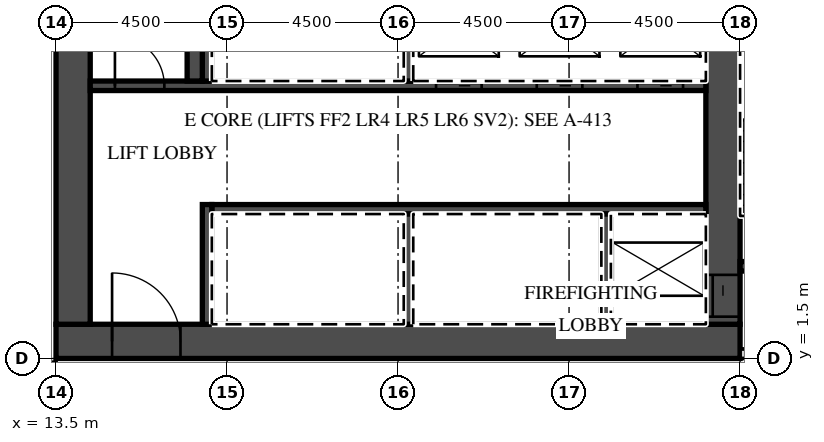
"""IFC4 building model, lengths in metres.
Left out: names, types, materials, properties, quantities, classifications, styles, units other than length and angle.
Written with IfcOpenShell. Run it as: python <this file> out.ifc"""

import sys

from ifc_helpers import new_model, si_unit, direction, frame, frame_2d, origin, place, context, subcontext, project, spatial, rectangle, extrude, element, fill, save


model = new_model("IFC4")
c1 = context("Model", 3, precision=1e-05, world=origin(), true_north=direction((0.0, 1.0)))
c2 = subcontext(c1, "Body", "Model", "MODEL_VIEW")
j1 = project(units=[si_unit("LENGTHUNIT", "METRE"), si_unit("PLANEANGLEUNIT", "RADIAN")], contexts=[c1])
p1 = place(None, origin())
s1 = spatial("IfcSite", under=j1, at=p1, CompositionType="ELEMENT")
p2 = place(p1, origin())
s2 = spatial("IfcBuilding", under=s1, at=p2, CompositionType="ELEMENT")
p3 = place(p2, frame((0.0, 0.0, 124.0)))
s3 = spatial("IfcBuildingStorey", under=s2, at=p3, CompositionType="ELEMENT", Elevation=124.0)
p4 = place(p3, frame((-39.316, 1.3, 0.0), z_axis=(0.0, 0.0, 1.0), x_axis=(1.0, 0.0, 0.0)))
e1 = element("IfcWall", 1, at=p4, inside=s3, PredefinedType="PARTITIONING", context=c2, shape_type="SweptSolid", body=[
    extrude(rectangle(XDim=52.816, YDim=0.2, at=frame_2d((26.408, 0.0))), origin(), (0.0, 0.0, 1.0), 3.02),
])
p5 = place(p4, frame((0.15, 0.0, 0.0)))
e2 = element("IfcOpeningElement", 2, at=p5, cuts=e1, PredefinedType="OPENING", context=c2, shape_type="SweptSolid", body=[
    extrude(rectangle(XDim=0.9, YDim=2.1, at=frame_2d((0.45, 1.05))), frame((0.0, 0.11, 0.0), z_axis=(0.0, -1.0, 0.0), x_axis=(1.0, 0.0, 0.0)), (0.0, 0.0, 1.0), 0.22),
])
p6 = place(p4, frame((3.891, 0.0, 0.0)))
e3 = element("IfcOpeningElement", 3, at=p6, cuts=e1, PredefinedType="OPENING", context=c2, shape_type="SweptSolid", body=[
    extrude(rectangle(XDim=1.0, YDim=2.1, at=frame_2d((0.5, 1.05))), frame((0.0, 0.11, 0.0), z_axis=(0.0, -1.0, 0.0), x_axis=(1.0, 0.0, 0.0)), (0.0, 0.0, 1.0), 0.22),
])
p7 = place(p4, frame((10.741, 0.0, 0.0)))
e4 = element("IfcOpeningElement", 4, at=p7, cuts=e1, PredefinedType="OPENING", context=c2, shape_type="SweptSolid", body=[
    extrude(rectangle(XDim=1.0, YDim=2.1, at=frame_2d((0.5, 1.05))), frame((0.0, 0.11, 0.0), z_axis=(0.0, -1.0, 0.0), x_axis=(1.0, 0.0, 0.0)), (0.0, 0.0, 1.0), 0.22),
])
p8 = place(p4, frame((15.266, 0.0, 0.0)))
e5 = element("IfcOpeningElement", 5, at=p8, cuts=e1, PredefinedType="OPENING", context=c2, shape_type="SweptSolid", body=[
    extrude(rectangle(XDim=1.0, YDim=2.1, at=frame_2d((0.5, 1.05))), frame((0.0, 0.11, 0.0), z_axis=(0.0, -1.0, 0.0), x_axis=(1.0, 0.0, 0.0)), (0.0, 0.0, 1.0), 0.22),
])
p9 = place(p4, frame((19.741, 0.0, 0.0)))
e6 = element("IfcOpeningElement", 6, at=p9, cuts=e1, PredefinedType="OPENING", context=c2, shape_type="SweptSolid", body=[
    extrude(rectangle(XDim=1.0, YDim=2.1, at=frame_2d((0.5, 1.05))), frame((0.0, 0.11, 0.0), z_axis=(0.0, -1.0, 0.0), x_axis=(1.0, 0.0, 0.0)), (0.0, 0.0, 1.0), 0.22),
])
p10 = place(p4, frame((26.678, 0.0, 0.0)))
e7 = element("IfcOpeningElement", 7, at=p10, cuts=e1, PredefinedType="OPENING", context=c2, shape_type="SweptSolid", body=[
    extrude(rectangle(XDim=1.2, YDim=2.1, at=frame_2d((0.6, 1.05))), frame((0.0, 0.11, 0.0), z_axis=(0.0, -1.0, 0.0), x_axis=(1.0, 0.0, 0.0)), (0.0, 0.0, 1.0), 0.22),
])
p11 = place(p4, frame((35.678, 0.0, 0.0)))
e8 = element("IfcOpeningElement", 8, at=p11, cuts=e1, PredefinedType="OPENING", context=c2, shape_type="SweptSolid", body=[
    extrude(rectangle(XDim=1.2, YDim=2.1, at=frame_2d((0.6, 1.05))), frame((0.0, 0.11, 0.0), z_axis=(0.0, -1.0, 0.0), x_axis=(1.0, 0.0, 0.0)), (0.0, 0.0, 1.0), 0.22),
])
p12 = place(p4, frame((41.754, 0.0, 0.0)))
e9 = element("IfcOpeningElement", 9, at=p12, cuts=e1, PredefinedType="OPENING", context=c2, shape_type="SweptSolid", body=[
    extrude(rectangle(XDim=1.2, YDim=2.1, at=frame_2d((0.6, 1.05))), frame((0.0, 0.11, 0.0), z_axis=(0.0, -1.0, 0.0), x_axis=(1.0, 0.0, 0.0)), (0.0, 0.0, 1.0), 0.22),
])
p13 = place(p4, frame((51.241, 0.0, 0.0)))
e10 = element("IfcOpeningElement", 10, at=p13, cuts=e1, PredefinedType="OPENING", context=c2, shape_type="SweptSolid", body=[
    extrude(rectangle(XDim=1.0, YDim=2.1, at=frame_2d((0.5, 1.05))), frame((0.0, 0.11, 0.0), z_axis=(0.0, -1.0, 0.0), x_axis=(1.0, 0.0, 0.0)), (0.0, 0.0, 1.0), 0.22),
])
p14 = place(p3, frame((13.5, 1.95, 0.0), z_axis=(0.0, 0.0, 1.0), x_axis=(1.0, 0.0, 0.0)))
e11 = element("IfcWall", 11, at=p14, inside=s3, PredefinedType="SHEAR", context=c2, shape_type="SweptSolid", body=[
    extrude(rectangle(XDim=18.0, YDim=0.9, at=frame_2d((9.0, 0.0))), origin(), (0.0, 0.0, 1.0), 3.02),
])
p15 = place(p14, frame((1.475, 0.0, 0.0)))
e12 = element("IfcOpeningElement", 12, at=p15, cuts=e11, PredefinedType="OPENING", context=c2, shape_type="SweptSolid", body=[
    extrude(rectangle(XDim=1.8, YDim=2.1, at=frame_2d((0.9, 1.05))), frame((0.0, 0.46, 0.0), z_axis=(0.0, -1.0, 0.0), x_axis=(1.0, 0.0, 0.0)), (0.0, 0.0, 1.0), 0.92),
])
p16 = place(p3, frame((31.05, 2.4, 0.0), z_axis=(0.0, 0.0, 1.0), x_axis=(0.0, 1.0, 0.0)))
e13 = element("IfcWall", 13, at=p16, inside=s3, PredefinedType="SHEAR", context=c2, shape_type="SweptSolid", body=[
    extrude(rectangle(XDim=12.8, YDim=0.9, at=frame_2d((6.4, 0.0))), origin(), (0.0, 0.0, 1.0), 3.02),
])
p17 = place(p16, frame((0.2, 0.0, 0.0)))
e14 = element("IfcOpeningElement", 14, at=p17, cuts=e13, PredefinedType="OPENING", context=c2, shape_type="SweptSolid", body=[
    extrude(rectangle(XDim=1.1, YDim=2.1, at=frame_2d((0.55, 1.05))), frame((0.0, 0.46, 0.0), z_axis=(0.0, -1.0, 0.0), x_axis=(1.0, 0.0, 0.0)), (0.0, 0.0, 1.0), 0.92),
])
p18 = place(p3, frame((13.95, 2.4, 0.0), z_axis=(0.0, 0.0, 1.0), x_axis=(0.0, 1.0, 0.0)))
e15 = element("IfcWall", 15, at=p18, inside=s3, PredefinedType="SHEAR", context=c2, shape_type="SweptSolid", body=[
    extrude(rectangle(XDim=12.2, YDim=0.9, at=frame_2d((6.1, 0.0))), origin(), (0.0, 0.0, 1.0), 3.02),
])
p19 = place(p3, frame((17.6, 5.425, 0.0), z_axis=(0.0, 0.0, 1.0), x_axis=(1.0, 0.0, 0.0)))
e16 = element("IfcWall", 16, at=p19, inside=s3, PredefinedType="SHEAR", context=c2, shape_type="SweptSolid", body=[
    extrude(rectangle(XDim=13.0, YDim=0.25, at=frame_2d((6.5, 0.0))), origin(), (0.0, 0.0, 1.0), 3.02),
])
p20 = place(p3, frame((17.475, 2.4, 0.0), z_axis=(0.0, 0.0, 1.0), x_axis=(0.0, 1.0, 0.0)))
e17 = element("IfcWall", 17, at=p20, inside=s3, PredefinedType="SHEAR", context=c2, shape_type="SweptSolid", body=[
    extrude(rectangle(XDim=3.15, YDim=0.25, at=frame_2d((1.575, 0.0))), origin(), (0.0, 0.0, 1.0), 3.02),
])
for number, where, z_axis, x_axis in (
    (18, (27.975, 2.4, 0.0), (0.0, 0.0, 1.0), (0.0, 1.0, 0.0)),
    (19, (22.775, 2.4, 0.0), (0.0, 0.0, 1.0), (0.0, 1.0, 0.0)),
):
    element("IfcWall", number, at=place(p3, frame(where, z_axis=z_axis, x_axis=x_axis)), inside=s3, PredefinedType="SHEAR", context=c2, shape_type="SweptSolid", body=[
        extrude(rectangle(XDim=2.9, YDim=0.25, at=frame_2d((1.45, 0.0))), origin(), (0.0, 0.0, 1.0), 3.02),
    ])
p21 = place(p3, frame((14.4, 8.675, 0.0), z_axis=(0.0, 0.0, 1.0), x_axis=(1.0, 0.0, 0.0)))
e20 = element("IfcWall", 20, at=p21, inside=s3, PredefinedType="SHEAR", context=c2, shape_type="SweptSolid", body=[
    extrude(rectangle(XDim=16.2, YDim=0.25, at=frame_2d((8.1, 0.0))), origin(), (0.0, 0.0, 1.0), 3.02),
])
p22 = place(p21, frame((14.4, 0.0, 0.0)))
e21 = element("IfcOpeningElement", 21, at=p22, cuts=e20, PredefinedType="OPENING", context=c2, shape_type="SweptSolid", body=[
    extrude(rectangle(XDim=1.2, YDim=2.1, at=frame_2d((0.6, 1.05))), frame((0.0, 0.135, 0.0), z_axis=(0.0, -1.0, 0.0), x_axis=(1.0, 0.0, 0.0)), (0.0, 0.0, 1.0), 0.27),
])
p23 = place(p21, frame((11.75, 0.0, 0.0)))
e22 = element("IfcOpeningElement", 22, at=p23, cuts=e20, PredefinedType="OPENING", context=c2, shape_type="SweptSolid", body=[
    extrude(rectangle(XDim=1.2, YDim=2.1, at=frame_2d((0.6, 1.05))), frame((0.0, 0.135, 0.0), z_axis=(0.0, -1.0, 0.0), x_axis=(1.0, 0.0, 0.0)), (0.0, 0.0, 1.0), 0.27),
])
p24 = place(p21, frame((9.1, 0.0, 0.0)))
e23 = element("IfcOpeningElement", 23, at=p24, cuts=e20, PredefinedType="OPENING", context=c2, shape_type="SweptSolid", body=[
    extrude(rectangle(XDim=1.2, YDim=2.1, at=frame_2d((0.6, 1.05))), frame((0.0, 0.135, 0.0), z_axis=(0.0, -1.0, 0.0), x_axis=(1.0, 0.0, 0.0)), (0.0, 0.0, 1.0), 0.27),
])
p25 = place(p21, frame((0.65, 0.0, 0.0)))
e24 = element("IfcOpeningElement", 24, at=p25, cuts=e20, PredefinedType="OPENING", context=c2, shape_type="SweptSolid", body=[
    extrude(rectangle(XDim=1.3, YDim=2.1, at=frame_2d((0.65, 1.05))), frame((0.0, 0.135, 0.0), z_axis=(0.0, -1.0, 0.0), x_axis=(1.0, 0.0, 0.0)), (0.0, 0.0, 1.0), 0.27),
])
for number, where, z_axis, x_axis in (
    (25, (17.475, 8.8, 0.0), (0.0, 0.0, 1.0), (0.0, 1.0, 0.0)),
    (26, (22.775, 8.8, 0.0), (0.0, 0.0, 1.0), (0.0, 1.0, 0.0)),
):
    element("IfcWall", number, at=place(p3, frame(where, z_axis=z_axis, x_axis=x_axis)), inside=s3, PredefinedType="SHEAR", context=c2, shape_type="SweptSolid", body=[
        extrude(rectangle(XDim=2.9, YDim=0.25, at=frame_2d((1.45, 0.0))), origin(), (0.0, 0.0, 1.0), 3.02),
    ])
p26 = place(p3, frame((17.15, 8.8, 0.0), z_axis=(0.0, 0.0, 1.0), x_axis=(0.0, 1.0, 0.0)))
e27 = element("IfcWall", 27, at=p26, inside=s3, PredefinedType="SHEAR", context=c2, shape_type="SweptSolid", body=[
    extrude(rectangle(XDim=5.8, YDim=0.4, at=frame_2d((2.9, 0.0))), origin(), (0.0, 0.0, 1.0), 3.02),
])
p27 = place(p3, frame((31.5, 1.625, 0.0), z_axis=(0.0, 0.0, 1.0), x_axis=(1.0, 0.0, 0.0)))
e28 = element("IfcWall", 28, at=p27, inside=s3, PredefinedType="PARTITIONING", context=c2, shape_type="SweptSolid", body=[
    extrude(rectangle(XDim=15.65, YDim=0.25, at=frame_2d((7.825, 0.0))), origin(), (0.0, 0.0, 1.0), 3.02),
])
p28 = place(p27, frame((0.625, 0.0, 0.0)))
e29 = element("IfcOpeningElement", 29, at=p28, cuts=e28, PredefinedType="OPENING", context=c2, shape_type="SweptSolid", body=[
    extrude(rectangle(XDim=1.3, YDim=2.1, at=frame_2d((0.65, 1.05))), frame((0.0, 0.135, 0.0), z_axis=(0.0, -1.0, 0.0), x_axis=(1.0, 0.0, 0.0)), (0.0, 0.0, 1.0), 0.27),
])
p29 = place(p27, frame((3.25, 0.0, 0.0)))
e30 = element("IfcOpeningElement", 30, at=p29, cuts=e28, PredefinedType="OPENING", context=c2, shape_type="SweptSolid", body=[
    extrude(rectangle(XDim=1.1, YDim=2.1, at=frame_2d((0.55, 1.05))), frame((0.0, 0.135, 0.0), z_axis=(0.0, -1.0, 0.0), x_axis=(1.0, 0.0, 0.0)), (0.0, 0.0, 1.0), 0.27),
])
p30 = place(p3, frame((31.5, 3.925, 0.0), z_axis=(0.0, 0.0, 1.0), x_axis=(1.0, 0.0, 0.0)))
e31 = element("IfcWall", 31, at=p30, inside=s3, PredefinedType="SHEAR", context=c2, shape_type="SweptSolid", body=[
    extrude(rectangle(XDim=2.55, YDim=0.25, at=frame_2d((1.275, 0.0))), origin(), (0.0, 0.0, 1.0), 3.02),
])
p31 = place(p30, frame((0.625, 0.0, 0.0)))
e32 = element("IfcOpeningElement", 32, at=p31, cuts=e31, PredefinedType="OPENING", context=c2, shape_type="SweptSolid", body=[
    extrude(rectangle(XDim=1.3, YDim=2.1, at=frame_2d((0.65, 1.05))), frame((0.0, 0.135, 0.0), z_axis=(0.0, -1.0, 0.0), x_axis=(1.0, 0.0, 0.0)), (0.0, 0.0, 1.0), 0.27),
])
p32 = place(p22, origin())
e33 = element("IfcDoor", 33, at=p32, inside=s3, OperationType="SLIDING_TO_LEFT", PredefinedType="DOOR", context=c2, shape_type="SweptSolid", body=[
    extrude(rectangle(XDim=1.2, YDim=2.1, at=frame_2d((0.6, 1.05))), frame((0.0, 0.025, 0.0), z_axis=(0.0, -1.0, 0.0), x_axis=(1.0, 0.0, 0.0)), (0.0, 0.0, 1.0), 0.05),
])
fill(e21, e33)
p33 = place(p23, origin())
e34 = element("IfcDoor", 34, at=p33, inside=s3, OperationType="SLIDING_TO_RIGHT", PredefinedType="DOOR", context=c2, shape_type="SweptSolid", body=[
    extrude(rectangle(XDim=1.2, YDim=2.1, at=frame_2d((0.6, 1.05))), frame((0.0, 0.025, 0.0), z_axis=(0.0, -1.0, 0.0), x_axis=(1.0, 0.0, 0.0)), (0.0, 0.0, 1.0), 0.05),
])
fill(e22, e34)
p34 = place(p24, origin())
e35 = element("IfcDoor", 35, at=p34, inside=s3, OperationType="SLIDING_TO_RIGHT", PredefinedType="DOOR", context=c2, shape_type="SweptSolid", body=[
    extrude(rectangle(XDim=1.2, YDim=2.1, at=frame_2d((0.6, 1.05))), frame((0.0, 0.025, 0.0), z_axis=(0.0, -1.0, 0.0), x_axis=(1.0, 0.0, 0.0)), (0.0, 0.0, 1.0), 0.05),
])
fill(e23, e35)
p35 = place(p17, origin())
e36 = element("IfcDoor", 36, at=p35, inside=s3, OperationType="SLIDING_TO_LEFT", PredefinedType="DOOR", context=c2, shape_type="SweptSolid", body=[
    extrude(rectangle(XDim=1.1, YDim=2.1, at=frame_2d((0.55, 1.05))), frame((0.0, 0.025, 0.0), z_axis=(0.0, -1.0, 0.0), x_axis=(1.0, 0.0, 0.0)), (0.0, 0.0, 1.0), 0.05),
])
fill(e14, e36)
p36 = place(p15, origin())
e37 = element("IfcDoor", 37, at=p36, inside=s3, OperationType="DOUBLE_DOOR_DOUBLE_SWING", PredefinedType="DOOR", context=c2, shape_type="SweptSolid", body=[
    extrude(rectangle(XDim=1.8, YDim=2.1, at=frame_2d((0.9, 1.05))), frame((0.0, 0.025, 0.0), z_axis=(0.0, -1.0, 0.0), x_axis=(1.0, 0.0, 0.0)), (0.0, 0.0, 1.0), 0.05),
])
fill(e12, e37)
p37 = place(p25, origin())
e38 = element("IfcDoor", 38, at=p37, inside=s3, OperationType="SINGLE_SWING_LEFT", PredefinedType="DOOR", context=c2, shape_type="SweptSolid", body=[
    extrude(rectangle(XDim=1.3, YDim=2.1, at=frame_2d((0.65, 1.05))), frame((0.0, 0.025, 0.0), z_axis=(0.0, -1.0, 0.0), x_axis=(1.0, 0.0, 0.0)), (0.0, 0.0, 1.0), 0.05),
])
fill(e24, e38)
save(model, sys.argv[1])
